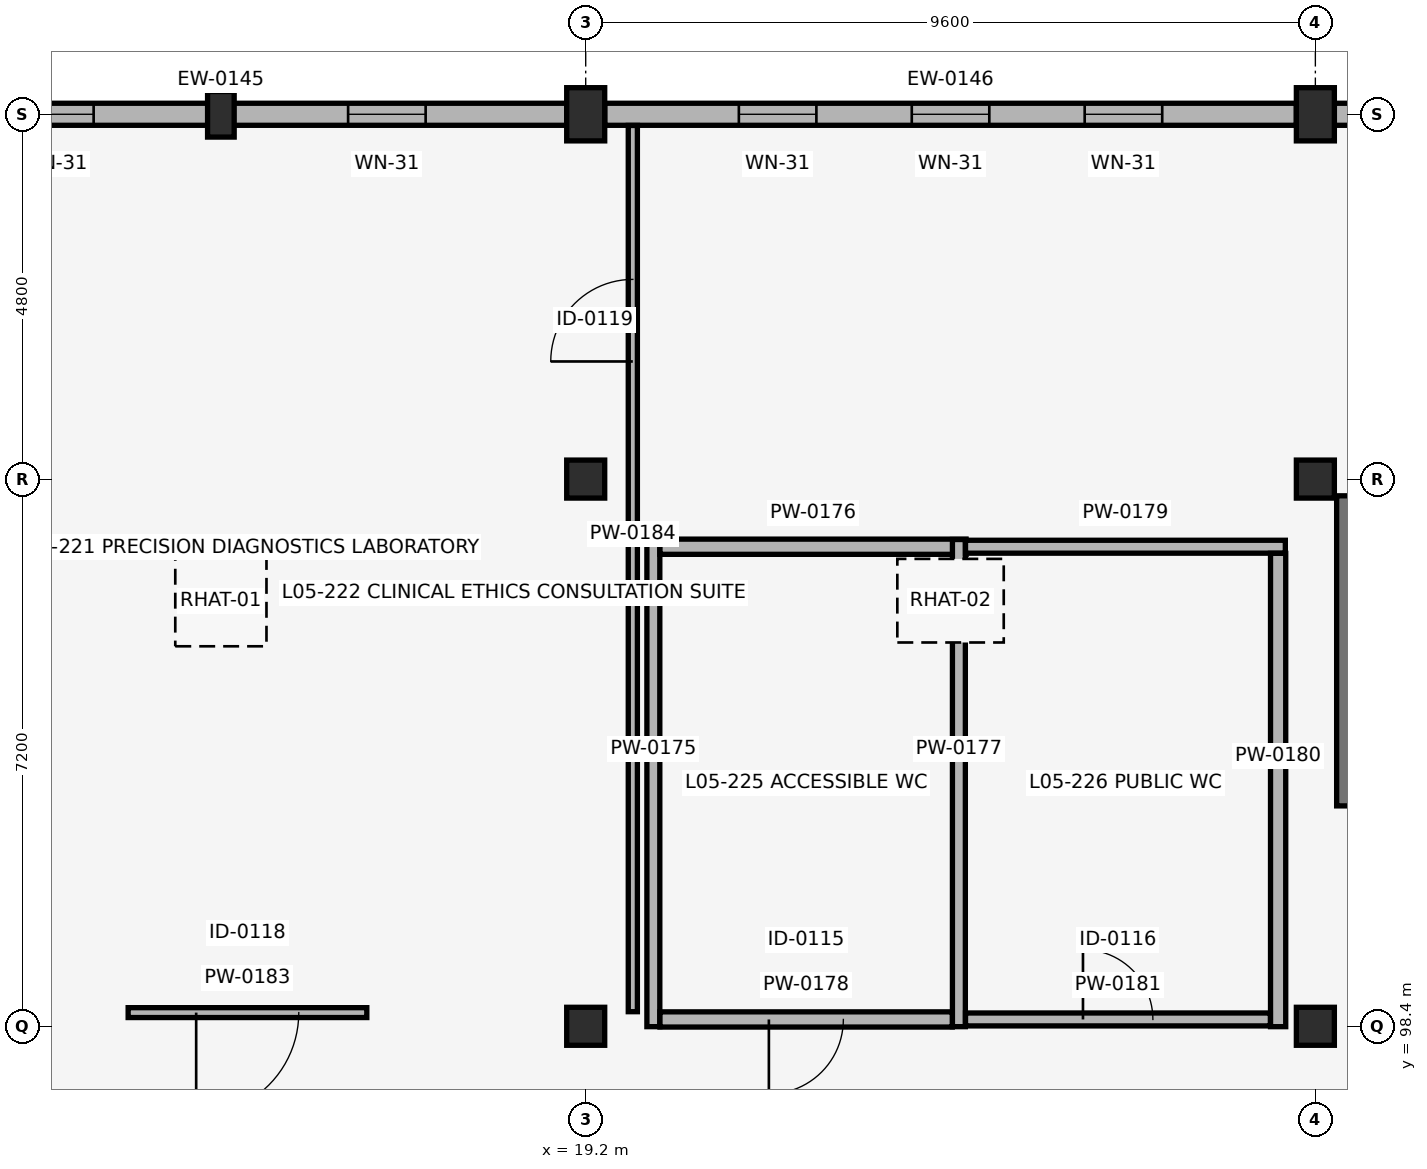
"""IFC4 building model, lengths in metres.
Left out: names, types, materials, properties, quantities, classifications, styles, units other than length and angle.
Written with IfcOpenShell. Run it as: python <this file> out.ifc"""

import sys

from ifc_helpers import new_model, si_unit, direction, frame, frame_2d, origin, origin_2d, place, context, subcontext, project, spatial, rectangle, extrude, element, fill, save


model = new_model("IFC4")
c1 = context("Model", 3, precision=1e-05, world=origin(), true_north=direction((0.0, 1.0)))
c2 = subcontext(c1, "Body", "Model", "MODEL_VIEW")
j1 = project(units=[si_unit("LENGTHUNIT", "METRE"), si_unit("PLANEANGLEUNIT", "RADIAN")], contexts=[c1])
p1 = place(None, origin())
s1 = spatial("IfcSite", under=j1, at=p1, CompositionType="ELEMENT")
p2 = place(p1, origin())
s2 = spatial("IfcBuilding", under=s1, at=p2, CompositionType="ELEMENT")
p3 = place(p2, frame((0.0, 0.0, 20.74)))
s3 = spatial("IfcBuildingStorey", under=s2, at=p3, CompositionType="ELEMENT", Elevation=20.74)
for number, where, z_axis, x_axis in (
    (1, (19.2, 98.4, 0.0), (0.0, 0.0, 1.0), (1.0, 0.0, 0.0)),
    (2, (19.2, 105.6, 0.0), (0.0, 0.0, 1.0), (1.0, 0.0, 0.0)),
):
    element("IfcColumn", number, at=place(p3, frame(where, z_axis=z_axis, x_axis=x_axis)), inside=s3, PredefinedType="COLUMN", context=c2, shape_type="SweptSolid", body=[
        extrude(rectangle(XDim=0.5, YDim=0.5, at=origin_2d()), origin(), (0.0, 0.0, 1.0), 4.08),
    ])
p4 = place(p3, frame((19.2, 110.4, 0.0), z_axis=(0.0, 0.0, 1.0), x_axis=(1.0, 0.0, 0.0)))
e3 = element("IfcColumn", 3, at=p4, inside=s3, PredefinedType="COLUMN", context=c2, shape_type="SweptSolid", body=[
    extrude(rectangle(XDim=0.5, YDim=0.7, at=origin_2d()), origin(), (0.0, 0.0, 1.0), 4.08),
])
for number, where, z_axis, x_axis in (
    (4, (28.8, 98.4, 0.0), (0.0, 0.0, 1.0), (1.0, 0.0, 0.0)),
    (5, (28.8, 105.6, 0.0), (0.0, 0.0, 1.0), (1.0, 0.0, 0.0)),
):
    element("IfcColumn", number, at=place(p3, frame(where, z_axis=z_axis, x_axis=x_axis)), inside=s3, PredefinedType="COLUMN", context=c2, shape_type="SweptSolid", body=[
        extrude(rectangle(XDim=0.5, YDim=0.5, at=origin_2d()), origin(), (0.0, 0.0, 1.0), 4.08),
    ])
p5 = place(p3, frame((28.8, 110.4, 0.0), z_axis=(0.0, 0.0, 1.0), x_axis=(1.0, 0.0, 0.0)))
e6 = element("IfcColumn", 6, at=p5, inside=s3, PredefinedType="COLUMN", context=c2, shape_type="SweptSolid", body=[
    extrude(rectangle(XDim=0.5, YDim=0.7, at=origin_2d()), origin(), (0.0, 0.0, 1.0), 4.08),
])
p6 = place(p3, frame((14.4, 110.4, 0.0), z_axis=(0.0, 0.0, 1.0), x_axis=(1.0, 0.0, 0.0)))
e7 = element("IfcColumn", 7, at=p6, inside=s3, PredefinedType="PILASTER", context=c2, shape_type="SweptSolid", body=[
    extrude(rectangle(XDim=0.35, YDim=0.6, at=origin_2d()), origin(), (0.0, 0.0, 1.0), 4.08),
])
p7 = place(p3, frame((18.95, 110.4, 0.0), z_axis=(0.0, 0.0, 1.0), x_axis=(-1.0, 0.0, 0.0)))
e8 = element("IfcWall", 8, at=p7, inside=s3, PredefinedType="SOLIDWALL", context=c2, shape_type="SweptSolid", body=[
    extrude(rectangle(XDim=9.1, YDim=0.29, at=frame_2d((4.55, 0.0))), origin(), (0.0, 0.0, 1.0), 3.07),
])
p8 = place(p7, frame((1.856, 0.0, 0.88)))
e9 = element("IfcOpeningElement", 9, at=p8, cuts=e8, PredefinedType="OPENING", context=c2, shape_type="SweptSolid", body=[
    extrude(rectangle(XDim=1.02, YDim=1.88, at=frame_2d((0.51, 0.94))), frame((0.0, 0.155, 0.0), z_axis=(0.0, -1.0, 0.0), x_axis=(1.0, 0.0, 0.0)), (0.0, 0.0, 1.0), 0.31),
])
p9 = place(p7, frame((6.224, 0.0, 0.88)))
e10 = element("IfcOpeningElement", 10, at=p9, cuts=e8, PredefinedType="OPENING", context=c2, shape_type="SweptSolid", body=[
    extrude(rectangle(XDim=1.02, YDim=1.88, at=frame_2d((0.51, 0.94))), frame((0.0, 0.155, 0.0), z_axis=(0.0, -1.0, 0.0), x_axis=(1.0, 0.0, 0.0)), (0.0, 0.0, 1.0), 0.31),
])
p10 = place(p3, frame((28.55, 110.4, 0.0), z_axis=(0.0, 0.0, 1.0), x_axis=(-1.0, 0.0, 0.0)))
e11 = element("IfcWall", 11, at=p10, inside=s3, PredefinedType="SOLIDWALL", context=c2, shape_type="SweptSolid", body=[
    extrude(rectangle(XDim=9.1, YDim=0.29, at=frame_2d((4.55, 0.0))), origin(), (0.0, 0.0, 1.0), 3.07),
])
p11 = place(p10, frame((1.765, 0.0, 0.88)))
e12 = element("IfcOpeningElement", 12, at=p11, cuts=e11, PredefinedType="OPENING", context=c2, shape_type="SweptSolid", body=[
    extrude(rectangle(XDim=1.02, YDim=1.88, at=frame_2d((0.51, 0.94))), frame((0.0, 0.155, 0.0), z_axis=(0.0, -1.0, 0.0), x_axis=(1.0, 0.0, 0.0)), (0.0, 0.0, 1.0), 0.31),
])
p12 = place(p10, frame((4.04, 0.0, 0.88)))
e13 = element("IfcOpeningElement", 13, at=p12, cuts=e11, PredefinedType="OPENING", context=c2, shape_type="SweptSolid", body=[
    extrude(rectangle(XDim=1.02, YDim=1.88, at=frame_2d((0.51, 0.94))), frame((0.0, 0.155, 0.0), z_axis=(0.0, -1.0, 0.0), x_axis=(1.0, 0.0, 0.0)), (0.0, 0.0, 1.0), 0.31),
])
p13 = place(p10, frame((6.315, 0.0, 0.88)))
e14 = element("IfcOpeningElement", 14, at=p13, cuts=e11, PredefinedType="OPENING", context=c2, shape_type="SweptSolid", body=[
    extrude(rectangle(XDim=1.02, YDim=1.88, at=frame_2d((0.51, 0.94))), frame((0.0, 0.155, 0.0), z_axis=(0.0, -1.0, 0.0), x_axis=(1.0, 0.0, 0.0)), (0.0, 0.0, 1.0), 0.31),
])
p14 = place(p3, frame((38.15, 110.4, 0.0), z_axis=(0.0, 0.0, 1.0), x_axis=(-1.0, 0.0, 0.0)))
e15 = element("IfcWall", 15, at=p14, inside=s3, PredefinedType="SOLIDWALL", context=c2, shape_type="SweptSolid", body=[
    extrude(rectangle(XDim=9.1, YDim=0.29, at=frame_2d((4.55, 0.0))), origin(), (0.0, 0.0, 1.0), 3.07),
])
p15 = place(p14, frame((1.856, 0.0, 0.88)))
e16 = element("IfcOpeningElement", 16, at=p15, cuts=e15, PredefinedType="OPENING", context=c2, shape_type="SweptSolid", body=[
    extrude(rectangle(XDim=1.02, YDim=1.88, at=frame_2d((0.51, 0.94))), frame((0.0, 0.155, 0.0), z_axis=(0.0, -1.0, 0.0), x_axis=(1.0, 0.0, 0.0)), (0.0, 0.0, 1.0), 0.31),
])
p16 = place(p14, frame((6.224, 0.0, 0.88)))
e17 = element("IfcOpeningElement", 17, at=p16, cuts=e15, PredefinedType="OPENING", context=c2, shape_type="SweptSolid", body=[
    extrude(rectangle(XDim=1.02, YDim=1.88, at=frame_2d((0.51, 0.94))), frame((0.0, 0.155, 0.0), z_axis=(0.0, -1.0, 0.0), x_axis=(1.0, 0.0, 0.0)), (0.0, 0.0, 1.0), 0.31),
])
p17 = place(p3, frame((29.22, 101.3, 0.0), z_axis=(0.0, 0.0, 1.0), x_axis=(0.0, 1.0, 0.0)))
e18 = element("IfcWall", 18, at=p17, inside=s3, PredefinedType="SHEAR", context=c2, shape_type="SweptSolid", body=[
    extrude(rectangle(XDim=4.08, YDim=0.28, at=frame_2d((2.04, 0.0))), origin(), (0.0, 0.0, 1.0), 3.8),
])
p18 = place(p3, frame((20.09, 98.395, 0.0), z_axis=(0.0, 0.0, 1.0), x_axis=(0.0, 1.0, 0.0)))
e19 = element("IfcWall", 19, at=p18, inside=s3, PredefinedType="PLUMBINGWALL", context=c2, shape_type="SweptSolid", body=[
    extrude(rectangle(XDim=6.41, YDim=0.17, at=frame_2d((3.205, 0.0))), origin(), (0.0, 0.0, 1.0), 3.12),
])
p19 = place(p3, frame((20.177, 104.71, 0.0), z_axis=(0.0, 0.0, 1.0), x_axis=(1.0, 0.0, 0.0)))
e20 = element("IfcWall", 20, at=p19, inside=s3, PredefinedType="PLUMBINGWALL", context=c2, shape_type="SweptSolid", body=[
    extrude(rectangle(XDim=4.028, YDim=0.2, at=frame_2d((2.014, 0.0))), origin(), (0.0, 0.0, 1.0), 3.12),
])
p20 = place(p3, frame((24.11, 98.395, 0.0), z_axis=(0.0, 0.0, 1.0), x_axis=(0.0, 1.0, 0.0)))
e21 = element("IfcWall", 21, at=p20, inside=s3, PredefinedType="PLUMBINGWALL", context=c2, shape_type="SweptSolid", body=[
    extrude(rectangle(XDim=6.41, YDim=0.17, at=frame_2d((3.205, 0.0))), origin(), (0.0, 0.0, 1.0), 3.12),
])
p21 = place(p3, frame((20.177, 98.49, 0.0), z_axis=(0.0, 0.0, 1.0), x_axis=(1.0, 0.0, 0.0)))
e22 = element("IfcWall", 22, at=p21, inside=s3, PredefinedType="PLUMBINGWALL", context=c2, shape_type="SweptSolid", body=[
    extrude(rectangle(XDim=3.846, YDim=0.2, at=frame_2d((1.923, 0.0))), origin(), (0.0, 0.0, 1.0), 3.12),
])
p22 = place(p21, frame((1.433, 0.0, 0.0)))
e23 = element("IfcOpeningElement", 23, at=p22, cuts=e22, PredefinedType="OPENING", context=c2, shape_type="SweptSolid", body=[
    extrude(rectangle(XDim=0.98, YDim=2.08, at=frame_2d((0.49, 1.04))), frame((0.0, 0.11, 0.0), z_axis=(0.0, -1.0, 0.0), x_axis=(1.0, 0.0, 0.0)), (0.0, 0.0, 1.0), 0.22),
])
p23 = place(p3, frame((24.197, 104.71, 0.0), z_axis=(0.0, 0.0, 1.0), x_axis=(1.0, 0.0, 0.0)))
e24 = element("IfcWall", 24, at=p23, inside=s3, PredefinedType="PLUMBINGWALL", context=c2, shape_type="SweptSolid", body=[
    extrude(rectangle(XDim=4.208, YDim=0.17, at=frame_2d((2.104, 0.0))), origin(), (0.0, 0.0, 1.0), 3.12),
])
p24 = place(p3, frame((28.31, 98.395, 0.0), z_axis=(0.0, 0.0, 1.0), x_axis=(0.0, 1.0, 0.0)))
e25 = element("IfcWall", 25, at=p24, inside=s3, PredefinedType="PLUMBINGWALL", context=c2, shape_type="SweptSolid", body=[
    extrude(rectangle(XDim=6.228, YDim=0.2, at=frame_2d((3.114, 0.0))), origin(), (0.0, 0.0, 1.0), 3.12),
])
p25 = place(p3, frame((24.197, 98.49, 0.0), z_axis=(0.0, 0.0, 1.0), x_axis=(1.0, 0.0, 0.0)))
e26 = element("IfcWall", 26, at=p25, inside=s3, PredefinedType="PLUMBINGWALL", context=c2, shape_type="SweptSolid", body=[
    extrude(rectangle(XDim=4.011, YDim=0.17, at=frame_2d((2.005, 0.0))), origin(), (0.0, 0.0, 1.0), 3.12),
])
p26 = place(p25, frame((1.545, 0.0, 0.0)))
e27 = element("IfcOpeningElement", 27, at=p26, cuts=e26, PredefinedType="OPENING", context=c2, shape_type="SweptSolid", body=[
    extrude(rectangle(XDim=0.92, YDim=2.08, at=frame_2d((0.46, 1.04))), frame((0.0, 0.095, 0.0), z_axis=(0.0, -1.0, 0.0), x_axis=(1.0, 0.0, 0.0)), (0.0, 0.0, 1.0), 0.19),
])
p27 = place(p3, frame((13.18, 98.58, 0.0), z_axis=(0.0, 0.0, 1.0), x_axis=(1.0, 0.0, 0.0)))
e28 = element("IfcWall", 28, at=p27, inside=s3, PredefinedType="PARTITIONING", context=c2, shape_type="SweptSolid", body=[
    extrude(rectangle(XDim=3.14, YDim=0.13, at=frame_2d((1.57, 0.0))), origin(), (0.0, 0.0, 1.0), 3.12),
])
p28 = place(p27, frame((0.895, 0.0, 0.0)))
e29 = element("IfcOpeningElement", 29, at=p28, cuts=e28, PredefinedType="OPENING", context=c2, shape_type="SweptSolid", body=[
    extrude(rectangle(XDim=1.35, YDim=2.12, at=frame_2d((0.675, 1.06))), frame((0.0, 0.075, 0.0), z_axis=(0.0, -1.0, 0.0), x_axis=(1.0, 0.0, 0.0)), (0.0, 0.0, 1.0), 0.15),
])
p29 = place(p3, frame((19.82, 98.592, 0.0), z_axis=(0.0, 0.0, 1.0), x_axis=(0.0, 1.0, 0.0)))
e30 = element("IfcWall", 30, at=p29, inside=s3, PredefinedType="PARTITIONING", context=c2, shape_type="SweptSolid", body=[
    extrude(rectangle(XDim=11.661, YDim=0.12, at=frame_2d((5.831, 0.0))), origin(), (0.0, 0.0, 1.0), 3.07),
])
p30 = place(p29, frame((8.556, 0.0, 0.0)))
e31 = element("IfcOpeningElement", 31, at=p30, cuts=e30, PredefinedType="OPENING", context=c2, shape_type="SweptSolid", body=[
    extrude(rectangle(XDim=1.08, YDim=2.1, at=frame_2d((0.54, 1.05))), frame((0.0, 0.07, 0.0), z_axis=(0.0, -1.0, 0.0), x_axis=(1.0, 0.0, 0.0)), (0.0, 0.0, 1.0), 0.14),
])
p31 = place(p8, origin())
e32 = element("IfcWindow", 32, at=p31, inside=s3, PartitioningType="SINGLE_PANEL", PredefinedType="WINDOW", context=c2, shape_type="SweptSolid", body=[
    extrude(rectangle(XDim=1.02, YDim=1.88, at=frame_2d((0.51, 0.94))), frame((0.0, 0.03, 0.0), z_axis=(0.0, -1.0, 0.0), x_axis=(1.0, 0.0, 0.0)), (0.0, 0.0, 1.0), 0.06),
])
fill(e9, e32)
p32 = place(p9, origin())
e33 = element("IfcWindow", 33, at=p32, inside=s3, PartitioningType="SINGLE_PANEL", PredefinedType="WINDOW", context=c2, shape_type="SweptSolid", body=[
    extrude(rectangle(XDim=1.02, YDim=1.88, at=frame_2d((0.51, 0.94))), frame((0.0, 0.03, 0.0), z_axis=(0.0, -1.0, 0.0), x_axis=(1.0, 0.0, 0.0)), (0.0, 0.0, 1.0), 0.06),
])
fill(e10, e33)
p33 = place(p11, origin())
e34 = element("IfcWindow", 34, at=p33, inside=s3, PartitioningType="SINGLE_PANEL", PredefinedType="WINDOW", context=c2, shape_type="SweptSolid", body=[
    extrude(rectangle(XDim=1.02, YDim=1.88, at=frame_2d((0.51, 0.94))), frame((0.0, 0.03, 0.0), z_axis=(0.0, -1.0, 0.0), x_axis=(1.0, 0.0, 0.0)), (0.0, 0.0, 1.0), 0.06),
])
fill(e12, e34)
p34 = place(p12, origin())
e35 = element("IfcWindow", 35, at=p34, inside=s3, PartitioningType="SINGLE_PANEL", PredefinedType="WINDOW", context=c2, shape_type="SweptSolid", body=[
    extrude(rectangle(XDim=1.02, YDim=1.88, at=frame_2d((0.51, 0.94))), frame((0.0, 0.03, 0.0), z_axis=(0.0, -1.0, 0.0), x_axis=(1.0, 0.0, 0.0)), (0.0, 0.0, 1.0), 0.06),
])
fill(e13, e35)
p35 = place(p13, origin())
e36 = element("IfcWindow", 36, at=p35, inside=s3, PartitioningType="SINGLE_PANEL", PredefinedType="WINDOW", context=c2, shape_type="SweptSolid", body=[
    extrude(rectangle(XDim=1.02, YDim=1.88, at=frame_2d((0.51, 0.94))), frame((0.0, 0.03, 0.0), z_axis=(0.0, -1.0, 0.0), x_axis=(1.0, 0.0, 0.0)), (0.0, 0.0, 1.0), 0.06),
])
fill(e14, e36)
p36 = place(p2, frame((0.0, 0.0, 24.82)))
p37 = place(p36, frame((0.0, 0.0, -0.29)))
p38 = place(p37, frame((14.4, 104.0, 0.0)))
p39 = place(p38, frame((0.0, 0.0, 0.24)))
e37 = element("IfcDoor", 37, at=p39, inside=s3, OperationType="SINGLE_SWING_LEFT", PredefinedType="TRAPDOOR", context=c2, shape_type="SweptSolid", body=[
    extrude(rectangle(XDim=1.2, YDim=1.2, at=origin_2d()), origin(), (0.0, 0.0, 1.0), 0.05),
])
p40 = place(p37, frame((24.0, 104.0, 0.0)))
p41 = place(p40, frame((0.0, 0.0, 0.24)))
e38 = element("IfcDoor", 38, at=p41, inside=s3, OperationType="SINGLE_SWING_LEFT", PredefinedType="TRAPDOOR", context=c2, shape_type="SweptSolid", body=[
    extrude(rectangle(XDim=1.4, YDim=1.1, at=origin_2d()), origin(), (0.0, 0.0, 1.0), 0.05),
])
p42 = place(p22, origin())
e39 = element("IfcDoor", 39, at=p42, inside=s3, OperationType="SINGLE_SWING_RIGHT", PredefinedType="DOOR", context=c2, shape_type="SweptSolid", body=[
    extrude(rectangle(XDim=0.98, YDim=2.08, at=frame_2d((0.49, 1.04))), frame((0.0, 0.025, 0.0), z_axis=(0.0, -1.0, 0.0), x_axis=(1.0, 0.0, 0.0)), (0.0, 0.0, 1.0), 0.05),
])
fill(e23, e39)
p43 = place(p26, origin())
e40 = element("IfcDoor", 40, at=p43, inside=s3, OperationType="SINGLE_SWING_LEFT", PredefinedType="DOOR", context=c2, shape_type="SweptSolid", body=[
    extrude(rectangle(XDim=0.92, YDim=2.08, at=frame_2d((0.46, 1.04))), frame((0.0, 0.025, 0.0), z_axis=(0.0, -1.0, 0.0), x_axis=(1.0, 0.0, 0.0)), (0.0, 0.0, 1.0), 0.05),
])
fill(e27, e40)
p44 = place(p28, origin())
e41 = element("IfcDoor", 41, at=p44, inside=s3, OperationType="SINGLE_SWING_RIGHT", PredefinedType="DOOR", context=c2, shape_type="SweptSolid", body=[
    extrude(rectangle(XDim=1.35, YDim=2.12, at=frame_2d((0.675, 1.06))), frame((0.0, 0.025, 0.0), z_axis=(0.0, -1.0, 0.0), x_axis=(1.0, 0.0, 0.0)), (0.0, 0.0, 1.0), 0.05),
])
fill(e29, e41)
p45 = place(p30, origin())
e42 = element("IfcDoor", 42, at=p45, inside=s3, OperationType="SINGLE_SWING_LEFT", PredefinedType="DOOR", context=c2, shape_type="SweptSolid", body=[
    extrude(rectangle(XDim=1.08, YDim=2.1, at=frame_2d((0.54, 1.05))), frame((0.0, 0.025, 0.0), z_axis=(0.0, -1.0, 0.0), x_axis=(1.0, 0.0, 0.0)), (0.0, 0.0, 1.0), 0.05),
])
fill(e31, e42)
save(model, sys.argv[1])
